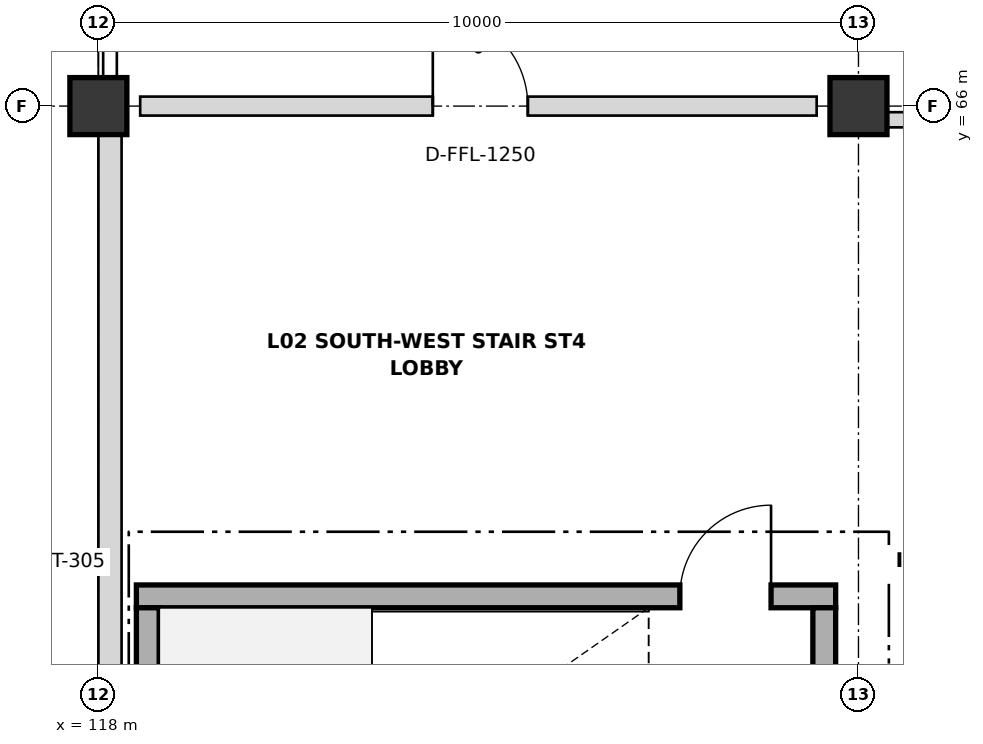
"""IFC4 building model, lengths in metres.
Left out: names, types, materials, properties, quantities, classifications, styles, units other than length and angle.
Written with IfcOpenShell. Run it as: python <this file> out.ifc"""

import sys

from ifc_helpers import new_model, si_unit, direction, frame, frame_2d, origin, origin_2d, place, context, subcontext, project, spatial, rectangle, extrude, element, fill, save


model = new_model("IFC4")
c1 = context("Model", 3, precision=1e-05, world=origin(), true_north=direction((0.0, 1.0)))
c2 = subcontext(c1, "Body", "Model", "MODEL_VIEW")
j1 = project(units=[si_unit("LENGTHUNIT", "METRE"), si_unit("PLANEANGLEUNIT", "RADIAN")], contexts=[c1])
p1 = place(None, origin())
s1 = spatial("IfcSite", under=j1, at=p1, CompositionType="ELEMENT")
p2 = place(p1, origin())
s2 = spatial("IfcBuilding", under=s1, at=p2, CompositionType="ELEMENT")
p3 = place(p2, frame((0.0, 0.0, 9.6)))
s3 = spatial("IfcBuildingStorey", under=s2, at=p3, CompositionType="ELEMENT", Elevation=9.6)
for number, where, z_axis, x_axis in (
    (1, (118.0, 66.0, 0.0), (0.0, 0.0, 1.0), (1.0, 0.0, 0.0)),
    (2, (128.0, 66.0, 0.0), (0.0, 0.0, 1.0), (1.0, 0.0, 0.0)),
):
    element("IfcColumn", number, at=place(p3, frame(where, z_axis=z_axis, x_axis=x_axis)), inside=s3, PredefinedType="COLUMN", context=c2, shape_type="SweptSolid", body=[
        extrude(rectangle(XDim=0.75, YDim=0.75, at=origin_2d()), origin(), (0.0, 0.0, 1.0), 4.8),
    ])
p4 = place(p3, frame((118.153, 54.37, 0.0), z_axis=(0.0, 0.0, 1.0), x_axis=(0.0, 1.0, 0.0)))
e3 = element("IfcWall", 3, at=p4, inside=s3, PredefinedType="SOLIDWALL", context=c2, shape_type="SweptSolid", body=[
    extrude(rectangle(XDim=11.26, YDim=0.305, at=frame_2d((5.63, 0.0))), origin(), (0.0, 0.0, 1.0), 3.658),
])
p5 = place(p3, frame((118.5, 59.55, 0.0), z_axis=(0.0, 0.0, 1.0), x_axis=(1.0, 0.0, 0.0)))
e4 = element("IfcWall", 4, at=p5, inside=s3, PredefinedType="SHEAR", context=c2, shape_type="SweptSolid", body=[
    extrude(rectangle(XDim=9.2, YDim=0.3, at=frame_2d((4.6, 0.0))), origin(), (0.0, 0.0, 1.0), 4.8),
])
p6 = place(p5, frame((7.15, 0.0, 0.0)))
e5 = element("IfcOpeningElement", 5, at=p6, cuts=e4, PredefinedType="OPENING", context=c2, shape_type="SweptSolid", body=[
    extrude(rectangle(XDim=1.2, YDim=2.15, at=frame_2d((0.6, 1.075))), frame((0.0, 0.16, 0.0), z_axis=(0.0, -1.0, 0.0), x_axis=(1.0, 0.0, 0.0)), (0.0, 0.0, 1.0), 0.32),
])
for number, where, z_axis, x_axis in (
    (6, (127.55, 59.4, 0.0), (0.0, 0.0, 1.0), (0.0, -1.0, 0.0)),
    (7, (118.65, 54.9, 0.0), (0.0, 0.0, 1.0), (0.0, 1.0, 0.0)),
):
    element("IfcWall", number, at=place(p3, frame(where, z_axis=z_axis, x_axis=x_axis)), inside=s3, PredefinedType="SHEAR", context=c2, shape_type="SweptSolid", body=[
        extrude(rectangle(XDim=4.5, YDim=0.3, at=frame_2d((2.25, 0.0))), origin(), (0.0, 0.0, 1.0), 4.8),
    ])
p7 = place(p3, frame((118.55, 66.0, 0.0), z_axis=(0.0, 0.0, 1.0), x_axis=(1.0, 0.0, 0.0)))
e8 = element("IfcWall", 8, at=p7, inside=s3, PredefinedType="PARTITIONING", context=c2, shape_type="SweptSolid", body=[
    extrude(rectangle(XDim=8.9, YDim=0.25, at=frame_2d((4.45, 0.0))), origin(), (0.0, 0.0, 1.0), 3.658),
])
p8 = place(p7, frame((3.85, 0.0, 0.0)))
e9 = element("IfcOpeningElement", 9, at=p8, cuts=e8, PredefinedType="OPENING", context=c2, shape_type="SweptSolid", body=[
    extrude(rectangle(XDim=1.25, YDim=2.15, at=frame_2d((0.625, 1.075))), frame((0.0, 0.135, 0.0), z_axis=(0.0, -1.0, 0.0), x_axis=(1.0, 0.0, 0.0)), (0.0, 0.0, 1.0), 0.27),
])
p9 = place(p3, frame((128.3, 65.82, 0.0), z_axis=(0.0, 0.0, 1.0), x_axis=(1.0, 0.0, 0.0)))
e10 = element("IfcWall", 10, at=p9, inside=s3, PredefinedType="PARTITIONING", context=c2, shape_type="SweptSolid", body=[
    extrude(rectangle(XDim=39.4, YDim=0.2, at=frame_2d((19.7, 0.0))), origin(), (0.0, 0.0, 1.0), 3.658),
])
p10 = place(p9, frame((13.9, 0.0, 0.0)))
e11 = element("IfcOpeningElement", 11, at=p10, cuts=e10, PredefinedType="OPENING", context=c2, shape_type="SweptSolid", body=[
    extrude(rectangle(XDim=1.6, YDim=2.15, at=frame_2d((0.8, 1.075))), frame((0.0, 0.11, 0.0), z_axis=(0.0, -1.0, 0.0), x_axis=(1.0, 0.0, 0.0)), (0.0, 0.0, 1.0), 0.22),
])
p11 = place(p6, origin())
e12 = element("IfcDoor", 12, at=p11, inside=s3, OperationType="SINGLE_SWING_RIGHT", PredefinedType="DOOR", context=c2, shape_type="SweptSolid", body=[
    extrude(rectangle(XDim=1.2, YDim=2.15, at=frame_2d((0.6, 1.075))), frame((0.0, 0.025, 0.0), z_axis=(0.0, -1.0, 0.0), x_axis=(1.0, 0.0, 0.0)), (0.0, 0.0, 1.0), 0.05),
])
fill(e5, e12)
p12 = place(p8, origin())
e13 = element("IfcDoor", 13, at=p12, inside=s3, OperationType="SINGLE_SWING_LEFT", PredefinedType="DOOR", context=c2, shape_type="SweptSolid", body=[
    extrude(rectangle(XDim=1.25, YDim=2.15, at=frame_2d((0.625, 1.075))), frame((0.0, 0.025, 0.0), z_axis=(0.0, -1.0, 0.0), x_axis=(1.0, 0.0, 0.0)), (0.0, 0.0, 1.0), 0.05),
])
fill(e9, e13)
save(model, sys.argv[1])
